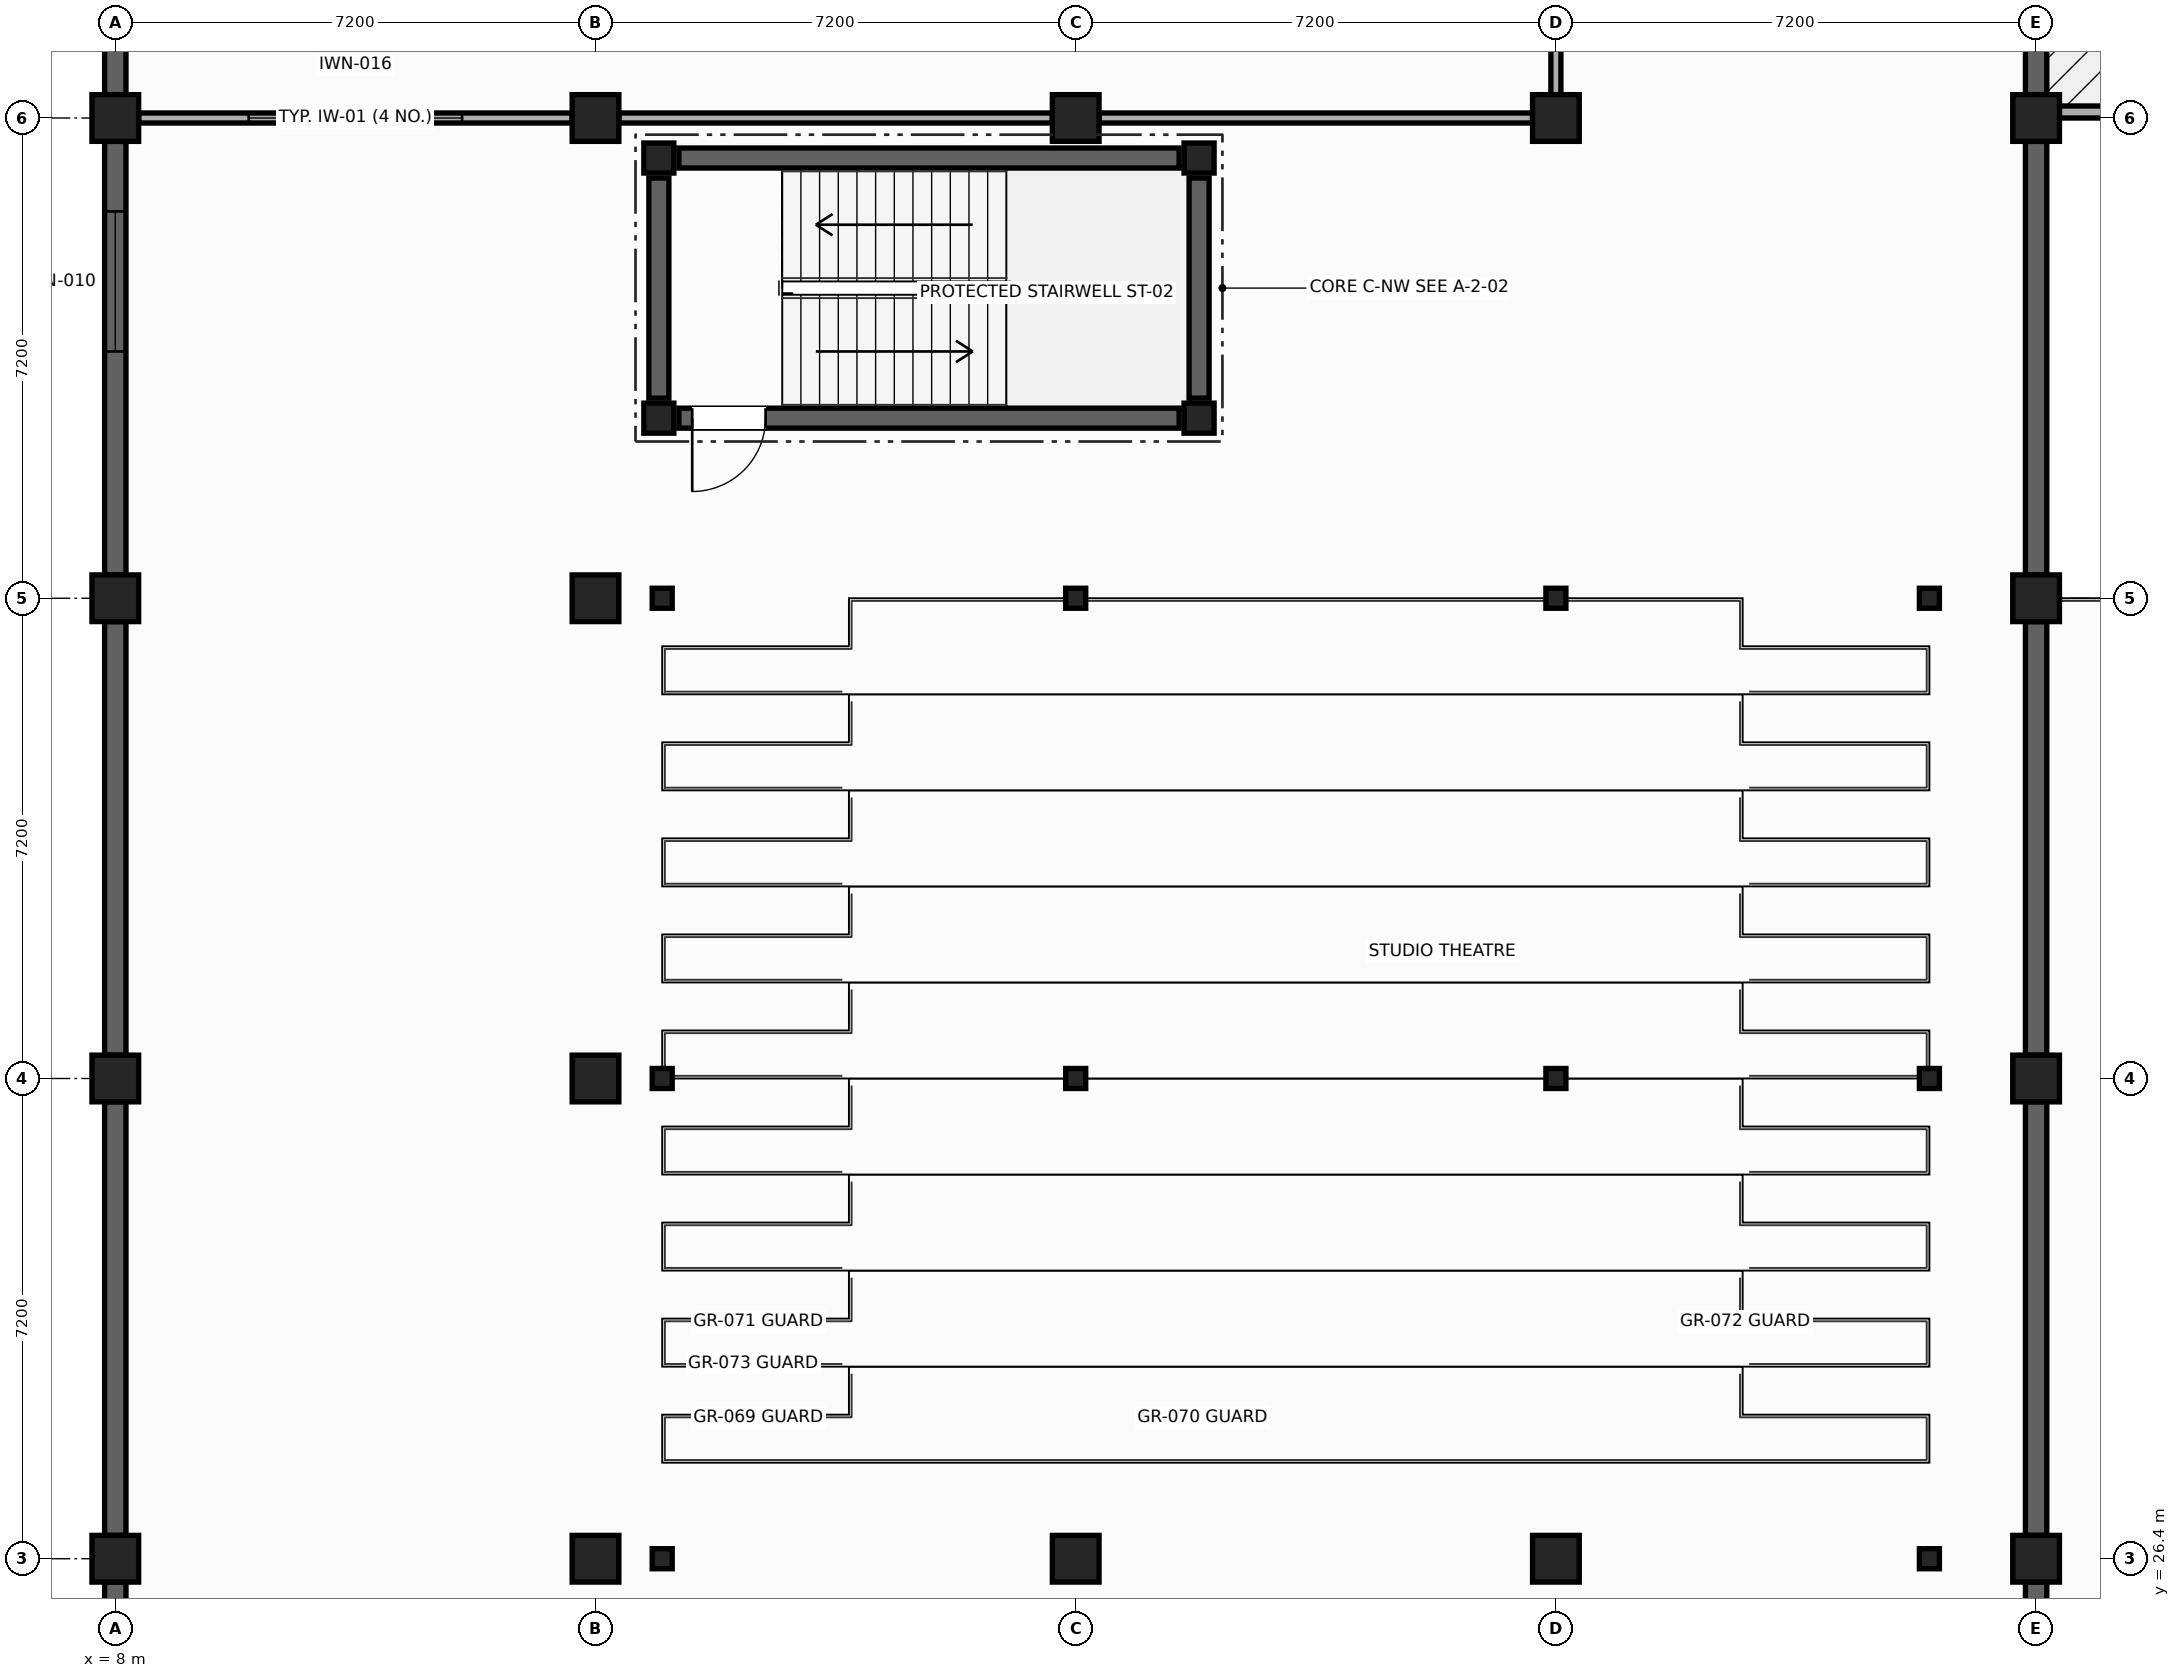
"""IFC4 building model, lengths in metres.
Left out: names, types, materials, properties, quantities, classifications, styles, units other than length and angle.
Written with IfcOpenShell. Run it as: python <this file> out.ifc"""

import sys

from ifc_helpers import new_model, si_unit, direction, frame, frame_2d, origin, origin_2d, place, context, subcontext, project, spatial, rectangle, i_section, extrude, element, fill, save


model = new_model("IFC4")
c1 = context("Model", 3, precision=1e-05, world=origin(), true_north=direction((0.0, 1.0)))
c2 = subcontext(c1, "Body", "Model", "MODEL_VIEW")
j1 = project(units=[si_unit("LENGTHUNIT", "METRE"), si_unit("PLANEANGLEUNIT", "RADIAN")], contexts=[c1])
p1 = place(None, origin())
s1 = spatial("IfcSite", under=j1, at=p1, CompositionType="ELEMENT")
p2 = place(p1, origin())
s2 = spatial("IfcBuilding", under=s1, at=p2, CompositionType="ELEMENT")
p3 = place(p2, frame((0.0, 0.0, 5.4)))
s3 = spatial("IfcBuildingStorey", under=s2, at=p3, CompositionType="ELEMENT", Elevation=5.4)
p4 = place(p3, frame((16.2, 26.4, 0.0), z_axis=(0.0, 0.0, 1.0), x_axis=(1.0, 0.0, 0.0)))
e1 = element("IfcColumn", 1, at=p4, inside=s3, PredefinedType="COLUMN", context=c2, shape_type="SweptSolid", body=[
    extrude(i_section(OverallWidth=0.3, OverallDepth=0.3, WebThickness=0.011, FlangeThickness=0.019, at=origin_2d()), origin(), (0.0, 0.0, 1.0), 0.36),
])
p5 = place(p3, frame((16.2, 33.6, 0.0), z_axis=(0.0, 0.0, 1.0), x_axis=(1.0, 0.0, 0.0)))
e2 = element("IfcColumn", 2, at=p5, inside=s3, PredefinedType="COLUMN", context=c2, shape_type="SweptSolid", body=[
    extrude(i_section(OverallWidth=0.3, OverallDepth=0.3, WebThickness=0.011, FlangeThickness=0.019, at=origin_2d()), origin(), (0.0, 0.0, 1.0), 1.21),
])
p6 = place(p3, frame((16.2, 40.8, 0.0), z_axis=(0.0, 0.0, 1.0), x_axis=(1.0, 0.0, 0.0)))
e3 = element("IfcColumn", 3, at=p6, inside=s3, PredefinedType="COLUMN", context=c2, shape_type="SweptSolid", body=[
    extrude(i_section(OverallWidth=0.3, OverallDepth=0.3, WebThickness=0.011, FlangeThickness=0.019, at=origin_2d()), origin(), (0.0, 0.0, 1.0), 2.06),
])
p7 = place(p3, frame((22.4, 33.6, 0.0), z_axis=(0.0, 0.0, 1.0), x_axis=(1.0, 0.0, 0.0)))
e4 = element("IfcColumn", 4, at=p7, inside=s3, PredefinedType="COLUMN", context=c2, shape_type="SweptSolid", body=[
    extrude(i_section(OverallWidth=0.3, OverallDepth=0.3, WebThickness=0.011, FlangeThickness=0.019, at=origin_2d()), origin(), (0.0, 0.0, 1.0), 1.21),
])
p8 = place(p3, frame((22.4, 40.8, 0.0), z_axis=(0.0, 0.0, 1.0), x_axis=(1.0, 0.0, 0.0)))
e5 = element("IfcColumn", 5, at=p8, inside=s3, PredefinedType="COLUMN", context=c2, shape_type="SweptSolid", body=[
    extrude(i_section(OverallWidth=0.3, OverallDepth=0.3, WebThickness=0.011, FlangeThickness=0.019, at=origin_2d()), origin(), (0.0, 0.0, 1.0), 2.06),
])
p9 = place(p3, frame((29.6, 33.6, 0.0), z_axis=(0.0, 0.0, 1.0), x_axis=(1.0, 0.0, 0.0)))
e6 = element("IfcColumn", 6, at=p9, inside=s3, PredefinedType="COLUMN", context=c2, shape_type="SweptSolid", body=[
    extrude(i_section(OverallWidth=0.3, OverallDepth=0.3, WebThickness=0.011, FlangeThickness=0.019, at=origin_2d()), origin(), (0.0, 0.0, 1.0), 1.21),
])
p10 = place(p3, frame((29.6, 40.8, 0.0), z_axis=(0.0, 0.0, 1.0), x_axis=(1.0, 0.0, 0.0)))
e7 = element("IfcColumn", 7, at=p10, inside=s3, PredefinedType="COLUMN", context=c2, shape_type="SweptSolid", body=[
    extrude(i_section(OverallWidth=0.3, OverallDepth=0.3, WebThickness=0.011, FlangeThickness=0.019, at=origin_2d()), origin(), (0.0, 0.0, 1.0), 2.06),
])
p11 = place(p3, frame((35.2, 26.4, 0.0), z_axis=(0.0, 0.0, 1.0), x_axis=(1.0, 0.0, 0.0)))
e8 = element("IfcColumn", 8, at=p11, inside=s3, PredefinedType="COLUMN", context=c2, shape_type="SweptSolid", body=[
    extrude(i_section(OverallWidth=0.3, OverallDepth=0.3, WebThickness=0.011, FlangeThickness=0.019, at=origin_2d()), origin(), (0.0, 0.0, 1.0), 0.36),
])
p12 = place(p3, frame((35.2, 33.6, 0.0), z_axis=(0.0, 0.0, 1.0), x_axis=(1.0, 0.0, 0.0)))
e9 = element("IfcColumn", 9, at=p12, inside=s3, PredefinedType="COLUMN", context=c2, shape_type="SweptSolid", body=[
    extrude(i_section(OverallWidth=0.3, OverallDepth=0.3, WebThickness=0.011, FlangeThickness=0.019, at=origin_2d()), origin(), (0.0, 0.0, 1.0), 1.21),
])
p13 = place(p3, frame((35.2, 40.8, 0.0), z_axis=(0.0, 0.0, 1.0), x_axis=(1.0, 0.0, 0.0)))
e10 = element("IfcColumn", 10, at=p13, inside=s3, PredefinedType="COLUMN", context=c2, shape_type="SweptSolid", body=[
    extrude(i_section(OverallWidth=0.3, OverallDepth=0.3, WebThickness=0.011, FlangeThickness=0.019, at=origin_2d()), origin(), (0.0, 0.0, 1.0), 2.06),
])
for number, where, z_axis, x_axis in (
    (11, (8.0, 26.4, 0.0), (0.0, 0.0, 1.0), (1.0, 0.0, 0.0)),
    (12, (15.2, 26.4, 0.0), (0.0, 0.0, 1.0), (0.0, 1.0, 0.0)),
    (13, (22.4, 26.4, 0.0), (0.0, 0.0, 1.0), (1.0, 0.0, 0.0)),
    (14, (29.6, 26.4, 0.0), (0.0, 0.0, 1.0), (1.0, 0.0, 0.0)),
    (15, (36.8, 26.4, 0.0), (0.0, 0.0, 1.0), (0.0, 1.0, 0.0)),
    (16, (8.0, 33.6, 0.0), (0.0, 0.0, 1.0), (0.0, 1.0, 0.0)),
    (17, (15.2, 33.6, 0.0), (0.0, 0.0, 1.0), (1.0, 0.0, 0.0)),
    (18, (36.8, 33.6, 0.0), (0.0, 0.0, 1.0), (1.0, 0.0, 0.0)),
    (19, (8.0, 40.8, 0.0), (0.0, 0.0, 1.0), (1.0, 0.0, 0.0)),
    (20, (15.2, 40.8, 0.0), (0.0, 0.0, 1.0), (1.0, 0.0, 0.0)),
    (21, (36.8, 40.8, 0.0), (0.0, 0.0, 1.0), (0.0, 1.0, 0.0)),
    (22, (8.0, 48.0, 0.0), (0.0, 0.0, 1.0), (1.0, 0.0, 0.0)),
    (23, (15.2, 48.0, 0.0), (0.0, 0.0, 1.0), (0.0, 1.0, 0.0)),
    (24, (22.4, 48.0, 0.0), (0.0, 0.0, 1.0), (1.0, 0.0, 0.0)),
    (25, (29.6, 48.0, 0.0), (0.0, 0.0, 1.0), (0.0, 1.0, 0.0)),
    (26, (36.8, 48.0, 0.0), (0.0, 0.0, 1.0), (1.0, 0.0, 0.0)),
):
    element("IfcColumn", number, at=place(p3, frame(where, z_axis=z_axis, x_axis=x_axis)), inside=s3, PredefinedType="COLUMN", context=c2, shape_type="SweptSolid", body=[
        extrude(rectangle(XDim=0.7, YDim=0.7, at=origin_2d()), origin(), (0.0, 0.0, 1.0), 4.5),
    ])
for number, where, z_axis, x_axis in (
    (27, (16.15, 43.5, 0.0), (0.0, 0.0, 1.0), (1.0, 0.0, 0.0)),
    (28, (24.25, 43.5, 0.0), (0.0, 0.0, 1.0), (1.0, 0.0, 0.0)),
    (29, (24.25, 47.4, 0.0), (0.0, 0.0, 1.0), (1.0, 0.0, 0.0)),
    (30, (16.15, 47.4, 0.0), (0.0, 0.0, 1.0), (1.0, 0.0, 0.0)),
):
    element("IfcColumn", number, at=place(p3, frame(where, z_axis=z_axis, x_axis=x_axis)), inside=s3, PredefinedType="COLUMN", context=c2, shape_type="SweptSolid", body=[
        extrude(rectangle(XDim=0.45, YDim=0.45, at=origin_2d()), origin(), (0.0, 0.0, 1.0), 4.5),
    ])
for number, where, z_axis, x_axis in (
    (31, (8.0, 19.55, 0.0), (0.0, 0.0, 1.0), (0.0, 1.0, 0.0)),
    (32, (8.0, 26.75, 0.0), (0.0, 0.0, 1.0), (0.0, 1.0, 0.0)),
    (33, (8.0, 33.95, 0.0), (0.0, 0.0, 1.0), (0.0, 1.0, 0.0)),
):
    element("IfcWall", number, at=place(p3, frame(where, z_axis=z_axis, x_axis=x_axis)), inside=s3, PredefinedType="SOLIDWALL", context=c2, shape_type="SweptSolid", body=[
        extrude(rectangle(XDim=6.5, YDim=0.32, at=frame_2d((3.25, 0.0))), origin(), (0.0, 0.0, 1.0), 4.25),
    ])
p14 = place(p3, frame((8.0, 41.15, 0.0), z_axis=(0.0, 0.0, 1.0), x_axis=(0.0, 1.0, 0.0)))
e34 = element("IfcWall", 34, at=p14, inside=s3, PredefinedType="SOLIDWALL", context=c2, shape_type="SweptSolid", body=[
    extrude(rectangle(XDim=6.5, YDim=0.32, at=frame_2d((3.25, 0.0))), origin(), (0.0, 0.0, 1.0), 4.25),
])
p15 = place(p14, frame((3.35, 0.0, 0.9)))
e35 = element("IfcOpeningElement", 35, at=p15, cuts=e34, PredefinedType="OPENING", context=c2, shape_type="SweptSolid", body=[
    extrude(rectangle(XDim=2.1, YDim=2.1, at=frame_2d((1.05, 1.05))), frame((0.0, 0.17, 0.0), z_axis=(0.0, -1.0, 0.0), x_axis=(1.0, 0.0, 0.0)), (0.0, 0.0, 1.0), 0.34),
])
p16 = place(p3, frame((8.0, 48.35, 0.0), z_axis=(0.0, 0.0, 1.0), x_axis=(0.0, 1.0, 0.0)))
e36 = element("IfcWall", 36, at=p16, inside=s3, PredefinedType="SOLIDWALL", context=c2, shape_type="SweptSolid", body=[
    extrude(rectangle(XDim=6.5, YDim=0.32, at=frame_2d((3.25, 0.0))), origin(), (0.0, 0.0, 1.0), 4.28),
])
p17 = place(p16, frame((2.05, 0.0, 0.9)))
e37 = element("IfcOpeningElement", 37, at=p17, cuts=e36, PredefinedType="OPENING", context=c2, shape_type="SweptSolid", body=[
    extrude(rectangle(XDim=2.4, YDim=2.1, at=frame_2d((1.2, 1.05))), frame((0.0, 0.17, 0.0), z_axis=(0.0, -1.0, 0.0), x_axis=(1.0, 0.0, 0.0)), (0.0, 0.0, 1.0), 0.34),
])
p18 = place(p3, frame((36.8, 54.85, 0.0), z_axis=(0.0, 0.0, 1.0), x_axis=(0.0, -1.0, 0.0)))
e38 = element("IfcWall", 38, at=p18, inside=s3, PredefinedType="SOLIDWALL", context=c2, shape_type="SweptSolid", body=[
    extrude(rectangle(XDim=6.5, YDim=0.32, at=frame_2d((3.25, 0.0))), origin(), (0.0, 0.0, 1.0), 4.28),
])
p19 = place(p18, frame((1.9, 0.0, 0.9)))
e39 = element("IfcOpeningElement", 39, at=p19, cuts=e38, PredefinedType="OPENING", context=c2, shape_type="SweptSolid", body=[
    extrude(rectangle(XDim=2.7, YDim=2.1, at=frame_2d((1.35, 1.05))), frame((0.0, 0.17, 0.0), z_axis=(0.0, -1.0, 0.0), x_axis=(1.0, 0.0, 0.0)), (0.0, 0.0, 1.0), 0.34),
])
p20 = place(p3, frame((36.8, 47.65, 0.0), z_axis=(0.0, 0.0, 1.0), x_axis=(0.0, -1.0, 0.0)))
e40 = element("IfcWall", 40, at=p20, inside=s3, PredefinedType="SOLIDWALL", context=c2, shape_type="SweptSolid", body=[
    extrude(rectangle(XDim=6.5, YDim=0.32, at=frame_2d((3.25, 0.0))), origin(), (0.0, 0.0, 1.0), 4.25),
])
for number, where, z_axis, x_axis in (
    (41, (36.8, 40.45, 0.0), (0.0, 0.0, 1.0), (0.0, -1.0, 0.0)),
    (42, (36.8, 33.25, 0.0), (0.0, 0.0, 1.0), (0.0, -1.0, 0.0)),
    (43, (36.8, 26.05, 0.0), (0.0, 0.0, 1.0), (0.0, -1.0, 0.0)),
):
    element("IfcWall", number, at=place(p3, frame(where, z_axis=z_axis, x_axis=x_axis)), inside=s3, PredefinedType="SOLIDWALL", context=c2, shape_type="SweptSolid", body=[
        extrude(rectangle(XDim=6.5, YDim=0.32, at=frame_2d((3.25, 0.0))), origin(), (0.0, 0.0, 1.0), 4.22),
    ])
p21 = place(p3, frame((37.15, 48.09, 0.0), z_axis=(0.0, 0.0, 1.0), x_axis=(1.0, 0.0, 0.0)))
e44 = element("IfcWall", 44, at=p21, inside=s3, PredefinedType="PARAPET", context=c2, shape_type="SweptSolid", body=[
    extrude(rectangle(XDim=6.76, YDim=0.18, at=frame_2d((3.38, 0.0))), origin(), (0.0, 0.0, 1.0), 1.15),
])
p22 = place(p3, frame((23.95, 43.5, 0.0), z_axis=(0.0, 0.0, 1.0), x_axis=(-1.0, 0.0, 0.0)))
e45 = element("IfcWall", 45, at=p22, inside=s3, PredefinedType="SHEAR", context=c2, shape_type="SweptSolid", body=[
    extrude(rectangle(XDim=7.5, YDim=0.3, at=frame_2d((3.75, 0.0))), origin(), (0.0, 0.0, 1.0), 4.25),
])
p23 = place(p22, frame((6.2, 0.0, 0.0)))
e46 = element("IfcOpeningElement", 46, at=p23, cuts=e45, PredefinedType="OPENING", context=c2, shape_type="SweptSolid", body=[
    extrude(rectangle(XDim=1.1, YDim=2.15, at=frame_2d((0.55, 1.075))), frame((0.0, 0.16, 0.0), z_axis=(0.0, -1.0, 0.0), x_axis=(1.0, 0.0, 0.0)), (0.0, 0.0, 1.0), 0.32),
])
p24 = place(p3, frame((16.15, 43.8, 0.0), z_axis=(0.0, 0.0, 1.0), x_axis=(0.0, 1.0, 0.0)))
e47 = element("IfcWall", 47, at=p24, inside=s3, PredefinedType="SHEAR", context=c2, shape_type="SweptSolid", body=[
    extrude(rectangle(XDim=3.3, YDim=0.3, at=frame_2d((1.65, 0.0))), origin(), (0.0, 0.0, 1.0), 4.25),
])
p25 = place(p3, frame((16.45, 47.4, 0.0), z_axis=(0.0, 0.0, 1.0), x_axis=(1.0, 0.0, 0.0)))
e48 = element("IfcWall", 48, at=p25, inside=s3, PredefinedType="SHEAR", context=c2, shape_type="SweptSolid", body=[
    extrude(rectangle(XDim=7.5, YDim=0.3, at=frame_2d((3.75, 0.0))), origin(), (0.0, 0.0, 1.0), 4.25),
])
p26 = place(p3, frame((24.25, 47.1, 0.0), z_axis=(0.0, 0.0, 1.0), x_axis=(0.0, -1.0, 0.0)))
e49 = element("IfcWall", 49, at=p26, inside=s3, PredefinedType="SHEAR", context=c2, shape_type="SweptSolid", body=[
    extrude(rectangle(XDim=3.3, YDim=0.3, at=frame_2d((1.65, 0.0))), origin(), (0.0, 0.0, 1.0), 4.25),
])
p27 = place(p3, frame((29.6, 48.35, 0.0), z_axis=(0.0, 0.0, 1.0), x_axis=(0.0, 1.0, 0.0)))
e50 = element("IfcWall", 50, at=p27, inside=s3, PredefinedType="PARTITIONING", context=c2, shape_type="SweptSolid", body=[
    extrude(rectangle(XDim=6.5, YDim=0.15, at=frame_2d((3.25, 0.0))), origin(), (0.0, 0.0, 1.0), 3.575),
])
p28 = place(p27, frame((2.45, 0.0, 0.0)))
e51 = element("IfcOpeningElement", 51, at=p28, cuts=e50, PredefinedType="OPENING", context=c2, shape_type="SweptSolid", body=[
    extrude(rectangle(XDim=1.6, YDim=2.25, at=frame_2d((0.8, 1.125))), frame((0.0, 0.085, 0.0), z_axis=(0.0, -1.0, 0.0), x_axis=(1.0, 0.0, 0.0)), (0.0, 0.0, 1.0), 0.17),
])
p29 = place(p3, frame((8.35, 48.0, 0.0), z_axis=(0.0, 0.0, 1.0), x_axis=(1.0, 0.0, 0.0)))
e52 = element("IfcWall", 52, at=p29, inside=s3, PredefinedType="PARTITIONING", context=c2, shape_type="SweptSolid", body=[
    extrude(rectangle(XDim=6.5, YDim=0.15, at=frame_2d((3.25, 0.0))), origin(), (0.0, 0.0, 1.0), 3.445),
])
p30 = place(p29, frame((1.65, 0.0, 1.1)))
e53 = element("IfcOpeningElement", 53, at=p30, cuts=e52, PredefinedType="OPENING", context=c2, shape_type="SweptSolid", body=[
    extrude(rectangle(XDim=3.2, YDim=1.3, at=frame_2d((1.6, 0.65))), frame((0.0, 0.085, 0.0), z_axis=(0.0, -1.0, 0.0), x_axis=(1.0, 0.0, 0.0)), (0.0, 0.0, 1.0), 0.17),
])
for number, where, z_axis, x_axis in (
    (54, (15.55, 48.0, 0.0), (0.0, 0.0, 1.0), (1.0, 0.0, 0.0)),
    (55, (22.75, 48.0, 0.0), (0.0, 0.0, 1.0), (1.0, 0.0, 0.0)),
):
    element("IfcWall", number, at=place(p3, frame(where, z_axis=z_axis, x_axis=x_axis)), inside=s3, PredefinedType="PARTITIONING", context=c2, shape_type="SweptSolid", body=[
        extrude(rectangle(XDim=6.5, YDim=0.15, at=frame_2d((3.25, 0.0))), origin(), (0.0, 0.0, 1.0), 3.445),
    ])
p31 = place(p15, origin())
e56 = element("IfcWindow", 56, at=p31, inside=s3, PartitioningType="SINGLE_PANEL", PredefinedType="WINDOW", context=c2, shape_type="SweptSolid", body=[
    extrude(rectangle(XDim=2.1, YDim=2.1, at=frame_2d((1.05, 1.05))), frame((0.0, 0.03, 0.0), z_axis=(0.0, -1.0, 0.0), x_axis=(1.0, 0.0, 0.0)), (0.0, 0.0, 1.0), 0.06),
])
fill(e35, e56)
p32 = place(p23, origin())
e57 = element("IfcDoor", 57, at=p32, inside=s3, OperationType="SINGLE_SWING_RIGHT", PredefinedType="DOOR", context=c2, shape_type="SweptSolid", body=[
    extrude(rectangle(XDim=1.1, YDim=2.15, at=frame_2d((0.55, 1.075))), frame((0.0, 0.025, 0.0), z_axis=(0.0, -1.0, 0.0), x_axis=(1.0, 0.0, 0.0)), (0.0, 0.0, 1.0), 0.05),
])
fill(e46, e57)
p33 = place(p30, origin())
e58 = element("IfcWindow", 58, at=p33, inside=s3, PartitioningType="SINGLE_PANEL", PredefinedType="WINDOW", context=c2, shape_type="SweptSolid", body=[
    extrude(rectangle(XDim=3.2, YDim=1.3, at=frame_2d((1.6, 0.65))), frame((0.0, 0.03, 0.0), z_axis=(0.0, -1.0, 0.0), x_axis=(1.0, 0.0, 0.0)), (0.0, 0.0, 1.0), 0.06),
])
fill(e53, e58)
save(model, sys.argv[1])
